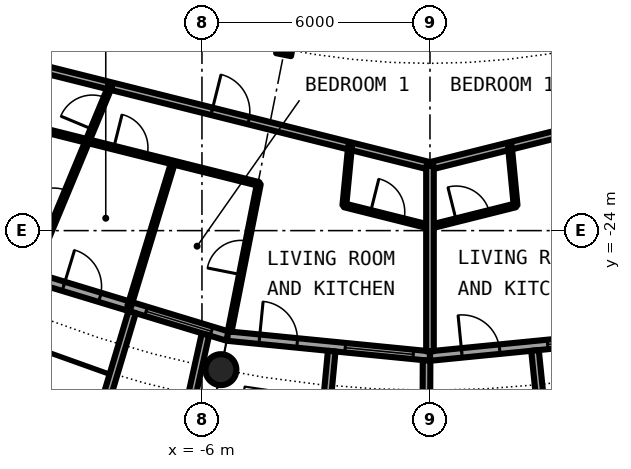
"""IFC4 building model, lengths in metres.
Left out: names, types, materials, properties, quantities, classifications, styles, units other than length and angle.
Written with IfcOpenShell. Run it as: python <this file> out.ifc"""

import sys

from ifc_helpers import new_model, si_unit, direction, frame, frame_2d, origin, origin_2d, place, context, subcontext, project, spatial, rectangle, hollow_circle, i_section, extrude, element, fill, save


model = new_model("IFC4")
c1 = context("Model", 3, precision=1e-05, world=origin(), true_north=direction((0.0, 1.0)))
c2 = subcontext(c1, "Body", "Model", "MODEL_VIEW")
j1 = project(units=[si_unit("LENGTHUNIT", "METRE"), si_unit("PLANEANGLEUNIT", "RADIAN")], contexts=[c1])
p1 = place(None, origin())
s1 = spatial("IfcSite", under=j1, at=p1, CompositionType="ELEMENT")
p2 = place(p1, origin())
s2 = spatial("IfcBuilding", under=s1, at=p2, CompositionType="ELEMENT")
p3 = place(p2, frame((0.0, 0.0, 190.2)))
s3 = spatial("IfcBuildingStorey", under=s2, at=p3, CompositionType="ELEMENT", Elevation=190.2)
p4 = place(p3, frame((-5.501, -27.658, 0.0), z_axis=(0.0, 0.0, 1.0), x_axis=(1.0, 0.0, 0.0)))
e1 = element("IfcColumn", 1, at=p4, inside=s3, PredefinedType="COLUMN", context=c2, shape_type="SweptSolid", body=[
    extrude(hollow_circle(Radius=0.406, WallThickness=0.03, at=origin_2d()), origin(), (0.0, 0.0, 1.0), 3.05),
])
p5 = place(p3, frame((-3.824, -19.223, 0.0), z_axis=(0.0, 0.0, 1.0), x_axis=(-0.195090322016, -0.980785280403, 0.0)))
e2 = element("IfcColumn", 2, at=p5, inside=s3, PredefinedType="COLUMN", context=c2, shape_type="SweptSolid", body=[
    extrude(i_section(OverallWidth=0.3, OverallDepth=0.4, WebThickness=0.013, FlangeThickness=0.024, FilletRadius=0.027, at=origin_2d()), origin(), (0.0, 0.0, 1.0), 3.05),
])
p6 = place(p3, frame((-10.447, -25.222, 0.0), z_axis=(0.0, 0.0, 1.0), x_axis=(0.956965678721, -0.290201119486, 0.0)))
e3 = element("IfcWall", 3, at=p6, inside=s3, PredefinedType="SOLIDWALL", context=c2, shape_type="SweptSolid", body=[
    extrude(rectangle(XDim=5.351, YDim=0.25, at=frame_2d((2.676, 0.0))), origin(), (0.0, 0.0, 1.0), 2.7),
])
p7 = place(p6, frame((0.841, 0.0, 0.0)))
e4 = element("IfcOpeningElement", 4, at=p7, cuts=e3, PredefinedType="OPENING", context=c2, shape_type="SweptSolid", body=[
    extrude(rectangle(XDim=1.0, YDim=2.2, at=frame_2d((0.5, 1.1))), frame((0.0, 0.135, 0.0), z_axis=(0.0, -1.0, 0.0), x_axis=(1.0, 0.0, 0.0)), (0.0, 0.0, 1.0), 0.27),
])
p8 = place(p6, frame((3.111, 0.0, 0.3)))
e5 = element("IfcOpeningElement", 5, at=p8, cuts=e3, PredefinedType="OPENING", context=c2, shape_type="SweptSolid", body=[
    extrude(rectangle(XDim=1.8, YDim=2.1, at=frame_2d((0.9, 1.05))), frame((0.0, 0.135, 0.0), z_axis=(0.0, -1.0, 0.0), x_axis=(1.0, 0.0, 0.0)), (0.0, 0.0, 1.0), 0.27),
])
p9 = place(p3, frame((-7.837, -26.144, -0.03), z_axis=(0.0, 0.0, 1.0), x_axis=(-0.287064767992, -0.957911174889, 0.0)))
e6 = element("IfcWall", 6, at=p9, inside=s3, PredefinedType="SOLIDWALL", context=c2, shape_type="SweptSolid", body=[
    extrude(rectangle(XDim=3.006, YDim=0.2, at=frame_2d((1.503, 0.0))), origin(), (0.0, 0.0, 1.0), 2.73),
])
p10 = place(p3, frame((-5.909, -26.729, -0.03), z_axis=(0.0, 0.0, 1.0), x_axis=(-0.216409053917, -0.976302781612, 0.0)))
e7 = element("IfcWall", 7, at=p10, inside=s3, PredefinedType="SOLIDWALL", context=c2, shape_type="SweptSolid", body=[
    extrude(rectangle(XDim=2.925, YDim=0.2, at=frame_2d((1.463, 0.0))), origin(), (0.0, 0.0, 1.0), 2.73),
])
p11 = place(p3, frame((-5.326, -26.775, 0.0), z_axis=(0.0, 0.0, 1.0), x_axis=(0.995173996315, -0.098126026407, 0.0)))
e8 = element("IfcWall", 8, at=p11, inside=s3, PredefinedType="SOLIDWALL", context=c2, shape_type="SweptSolid", body=[
    extrude(rectangle(XDim=5.352, YDim=0.25, at=frame_2d((2.676, 0.0))), origin(), (0.0, 0.0, 1.0), 2.7),
])
p12 = place(p11, frame((0.841, 0.0, 0.0)))
e9 = element("IfcOpeningElement", 9, at=p12, cuts=e8, PredefinedType="OPENING", context=c2, shape_type="SweptSolid", body=[
    extrude(rectangle(XDim=1.0, YDim=2.2, at=frame_2d((0.5, 1.1))), frame((0.0, 0.135, 0.0), z_axis=(0.0, -1.0, 0.0), x_axis=(1.0, 0.0, 0.0)), (0.0, 0.0, 1.0), 0.27),
])
p13 = place(p11, frame((3.111, 0.0, 0.3)))
e10 = element("IfcOpeningElement", 10, at=p13, cuts=e8, PredefinedType="OPENING", context=c2, shape_type="SweptSolid", body=[
    extrude(rectangle(XDim=1.8, YDim=2.1, at=frame_2d((0.9, 1.05))), frame((0.0, 0.135, 0.0), z_axis=(0.0, -1.0, 0.0), x_axis=(1.0, 0.0, 0.0)), (0.0, 0.0, 1.0), 0.27),
])
p14 = place(p3, frame((-2.586, -27.171, -0.03), z_axis=(0.0, 0.0, 1.0), x_axis=(-0.094548432284, -0.995520262954, 0.0)))
e11 = element("IfcWall", 11, at=p14, inside=s3, PredefinedType="SOLIDWALL", context=c2, shape_type="SweptSolid", body=[
    extrude(rectangle(XDim=3.006, YDim=0.2, at=frame_2d((1.503, 0.0))), origin(), (0.0, 0.0, 1.0), 2.73),
])
p15 = place(p3, frame((-0.09, -27.417, -0.03), z_axis=(0.0, 0.0, 1.0), x_axis=(-0.00347308367, -0.999993968827, 0.0)))
e12 = element("IfcWall", 12, at=p15, inside=s3, PredefinedType="SOLIDWALL", context=c2, shape_type="SweptSolid", body=[
    extrude(rectangle(XDim=2.882, YDim=0.2, at=frame_2d((1.441, 0.0))), origin(), (0.0, 0.0, 1.0), 2.73),
])
p16 = place(p3, frame((0.0, -27.3, 0.0), z_axis=(0.0, 0.0, 1.0), x_axis=(0.995173996315, 0.098126026407, 0.0)))
e13 = element("IfcWall", 13, at=p16, inside=s3, PredefinedType="SOLIDWALL", context=c2, shape_type="SweptSolid", body=[
    extrude(rectangle(XDim=5.352, YDim=0.25, at=frame_2d((2.676, 0.0))), origin(), (0.0, 0.0, 1.0), 2.7),
])
p17 = place(p16, frame((0.841, 0.0, 0.0)))
e14 = element("IfcOpeningElement", 14, at=p17, cuts=e13, PredefinedType="OPENING", context=c2, shape_type="SweptSolid", body=[
    extrude(rectangle(XDim=1.0, YDim=2.2, at=frame_2d((0.5, 1.1))), frame((0.0, 0.135, 0.0), z_axis=(0.0, -1.0, 0.0), x_axis=(1.0, 0.0, 0.0)), (0.0, 0.0, 1.0), 0.27),
])
p18 = place(p16, frame((3.111, 0.0, 0.3)))
e15 = element("IfcOpeningElement", 15, at=p18, cuts=e13, PredefinedType="OPENING", context=c2, shape_type="SweptSolid", body=[
    extrude(rectangle(XDim=1.8, YDim=2.1, at=frame_2d((0.9, 1.05))), frame((0.0, 0.135, 0.0), z_axis=(0.0, -1.0, 0.0), x_axis=(1.0, 0.0, 0.0)), (0.0, 0.0, 1.0), 0.27),
])
p19 = place(p3, frame((2.764, -27.153, -0.03), z_axis=(0.0, 0.0, 1.0), x_axis=(0.101505487237, -0.994834979311, 0.0)))
e16 = element("IfcWall", 16, at=p19, inside=s3, PredefinedType="SOLIDWALL", context=c2, shape_type="SweptSolid", body=[
    extrude(rectangle(XDim=3.007, YDim=0.2, at=frame_2d((1.503, 0.0))), origin(), (0.0, 0.0, 1.0), 2.73),
])
p20 = place(p3, frame((-11.266, -21.08, 0.0), z_axis=(0.0, 0.0, 1.0), x_axis=(0.970080680347, -0.24278277043, 0.0)))
e17 = element("IfcWall", 17, at=p20, inside=s3, PredefinedType="PARTITIONING", context=c2, shape_type="SweptSolid", body=[
    extrude(rectangle(XDim=6.973, YDim=0.1, at=frame_2d((3.486, 0.0))), origin(), (0.0, 0.0, 1.0), 2.7),
])
p21 = place(p20, frame((3.036, 0.0, 0.0)))
e18 = element("IfcOpeningElement", 18, at=p21, cuts=e17, PredefinedType="OPENING", context=c2, shape_type="SweptSolid", body=[
    extrude(rectangle(XDim=0.9, YDim=2.3, at=frame_2d((0.45, 1.15))), frame((0.0, 0.06, 0.0), z_axis=(0.0, -1.0, 0.0), x_axis=(1.0, 0.0, 0.0)), (0.0, 0.0, 1.0), 0.12),
])
p22 = place(p3, frame((-2.253, -23.336, 0.0), z_axis=(0.0, 0.0, 1.0), x_axis=(0.970068250789, -0.242832429489, 0.0)))
e19 = element("IfcWall", 19, at=p22, inside=s3, PredefinedType="PARTITIONING", context=c2, shape_type="SweptSolid", body=[
    extrude(rectangle(XDim=2.323, YDim=0.1, at=frame_2d((1.161, 0.0))), origin(), (0.0, 0.0, 1.0), 2.7),
])
p23 = place(p22, frame((0.711, 0.0, 0.0)))
e20 = element("IfcOpeningElement", 20, at=p23, cuts=e19, PredefinedType="OPENING", context=c2, shape_type="SweptSolid", body=[
    extrude(rectangle(XDim=0.9, YDim=2.3, at=frame_2d((0.45, 1.15))), frame((0.0, 0.06, 0.0), z_axis=(0.0, -1.0, 0.0), x_axis=(1.0, 0.0, 0.0)), (0.0, 0.0, 1.0), 0.12),
])
p24 = place(p3, frame((0.0, -23.9, 0.0), z_axis=(0.0, 0.0, 1.0), x_axis=(0.970068250789, 0.242832429489, 0.0)))
e21 = element("IfcWall", 21, at=p24, inside=s3, PredefinedType="PARTITIONING", context=c2, shape_type="SweptSolid", body=[
    extrude(rectangle(XDim=2.323, YDim=0.1, at=frame_2d((1.161, 0.0))), origin(), (0.0, 0.0, 1.0), 2.7),
])
p25 = place(p24, frame((0.711, 0.0, 0.0)))
e22 = element("IfcOpeningElement", 22, at=p25, cuts=e21, PredefinedType="OPENING", context=c2, shape_type="SweptSolid", body=[
    extrude(rectangle(XDim=0.9, YDim=2.3, at=frame_2d((0.45, 1.15))), frame((0.0, 0.06, 0.0), z_axis=(0.0, -1.0, 0.0), x_axis=(1.0, 0.0, 0.0)), (0.0, 0.0, 1.0), 0.12),
])
p26 = place(p3, frame((-10.517, -19.665, 0.0), z_axis=(0.0, 0.0, 1.0), x_axis=(0.970023226325, -0.243012222716, 0.0)))
e23 = element("IfcWall", 23, at=p26, inside=s3, PredefinedType="PARTITIONING", context=c2, shape_type="SweptSolid", body=[
    extrude(rectangle(XDim=10.847, YDim=0.2, at=frame_2d((5.424, 0.0))), origin(), (0.0, 0.0, 1.0), 2.7),
])
p27 = place(p26, frame((4.924, 0.0, 0.0)))
e24 = element("IfcOpeningElement", 24, at=p27, cuts=e23, PredefinedType="OPENING", context=c2, shape_type="SweptSolid", body=[
    extrude(rectangle(XDim=1.0, YDim=2.3, at=frame_2d((0.5, 1.15))), frame((0.0, 0.11, 0.0), z_axis=(0.0, -1.0, 0.0), x_axis=(1.0, 0.0, 0.0)), (0.0, 0.0, 1.0), 0.22),
])
p28 = place(p3, frame((-0.005, -22.301, 0.0), z_axis=(0.0, 0.0, 1.0), x_axis=(0.970023226325, 0.243012222716, 0.0)))
e25 = element("IfcWall", 25, at=p28, inside=s3, PredefinedType="PARTITIONING", context=c2, shape_type="SweptSolid", body=[
    extrude(rectangle(XDim=10.847, YDim=0.2, at=frame_2d((5.424, 0.0))), origin(), (0.0, 0.0, 1.0), 2.7),
])
p29 = place(p28, frame((4.924, 0.0, 0.0)))
e26 = element("IfcOpeningElement", 26, at=p29, cuts=e25, PredefinedType="OPENING", context=c2, shape_type="SweptSolid", body=[
    extrude(rectangle(XDim=1.0, YDim=2.3, at=frame_2d((0.5, 1.15))), frame((0.0, 0.11, 0.0), z_axis=(0.0, -1.0, 0.0), x_axis=(1.0, 0.0, 0.0)), (0.0, 0.0, 1.0), 0.22),
])
p30 = place(p3, frame((-10.447, -25.086, 0.0), z_axis=(0.0, 0.0, 1.0), x_axis=(0.384363513821, 0.923181828917, 0.0)))
e27 = element("IfcWall", 27, at=p30, inside=s3, PredefinedType="PARTITIONING", context=c2, shape_type="SweptSolid", body=[
    extrude(rectangle(XDim=5.3, YDim=0.1, at=frame_2d((2.65, 0.0))), origin(), (0.0, 0.0, 1.0), 2.7),
])
p31 = place(p30, frame((4.065, 0.0, 0.0)))
e28 = element("IfcOpeningElement", 28, at=p31, cuts=e27, PredefinedType="OPENING", context=c2, shape_type="SweptSolid", body=[
    extrude(rectangle(XDim=0.9, YDim=2.3, at=frame_2d((0.45, 1.15))), frame((0.0, 0.06, 0.0), z_axis=(0.0, -1.0, 0.0), x_axis=(1.0, 0.0, 0.0)), (0.0, 0.0, 1.0), 0.12),
])
p32 = place(p30, frame((1.415, 0.0, 0.0)))
e29 = element("IfcOpeningElement", 29, at=p32, cuts=e27, PredefinedType="OPENING", context=c2, shape_type="SweptSolid", body=[
    extrude(rectangle(XDim=0.9, YDim=2.3, at=frame_2d((0.45, 1.15))), frame((0.0, 0.06, 0.0), z_axis=(0.0, -1.0, 0.0), x_axis=(1.0, 0.0, 0.0)), (0.0, 0.0, 1.0), 0.12),
])
p33 = place(p3, frame((-7.914, -25.997, 0.0), z_axis=(0.0, 0.0, 1.0), x_axis=(0.291291575636, 0.956634317785, 0.0)))
e30 = element("IfcWall", 30, at=p33, inside=s3, PredefinedType="PARTITIONING", context=c2, shape_type="SweptSolid", body=[
    extrude(rectangle(XDim=3.962, YDim=0.1, at=frame_2d((1.981, 0.0))), origin(), (0.0, 0.0, 1.0), 2.7),
])
p34 = place(p3, frame((-5.272, -26.659, 0.0), z_axis=(0.0, 0.0, 1.0), x_axis=(0.194089507313, 0.980983824103, 0.0)))
e31 = element("IfcWall", 31, at=p34, inside=s3, PredefinedType="PARTITIONING", context=c2, shape_type="SweptSolid", body=[
    extrude(rectangle(XDim=3.962, YDim=0.1, at=frame_2d((1.981, 0.0))), origin(), (0.0, 0.0, 1.0), 2.7),
])
p35 = place(p34, frame((1.531, 0.0, 0.0)))
e32 = element("IfcOpeningElement", 32, at=p35, cuts=e31, PredefinedType="OPENING", context=c2, shape_type="SweptSolid", body=[
    extrude(rectangle(XDim=0.9, YDim=2.3, at=frame_2d((0.45, 1.15))), frame((0.0, 0.06, 0.0), z_axis=(0.0, -1.0, 0.0), x_axis=(1.0, 0.0, 0.0)), (0.0, 0.0, 1.0), 0.12),
])
p36 = place(p3, frame((-2.253, -23.336, 0.0), z_axis=(0.0, 0.0, 1.0), x_axis=(0.09608568494, 0.995373066317, 0.0)))
e33 = element("IfcWall", 33, at=p36, inside=s3, PredefinedType="PARTITIONING", context=c2, shape_type="SweptSolid", body=[
    extrude(rectangle(XDim=1.57, YDim=0.1, at=frame_2d((0.785, 0.0))), origin(), (0.0, 0.0, 1.0), 2.7),
])
p37 = place(p3, frame((0.0, -27.175, 0.0), z_axis=(0.0, 0.0, 1.0), x_axis=(0.0, 1.0, 0.0)))
e34 = element("IfcWall", 34, at=p37, inside=s3, PredefinedType="PARTITIONING", context=c2, shape_type="SweptSolid", body=[
    extrude(rectangle(XDim=4.875, YDim=0.2, at=frame_2d((2.438, 0.0))), origin(), (0.0, 0.0, 1.0), 2.7),
])
p38 = place(p3, frame((2.102, -21.773, 0.0), z_axis=(0.0, 0.0, 1.0), x_axis=(0.09608568494, -0.995373066317, 0.0)))
e35 = element("IfcWall", 35, at=p38, inside=s3, PredefinedType="PARTITIONING", context=c2, shape_type="SweptSolid", body=[
    extrude(rectangle(XDim=1.57, YDim=0.1, at=frame_2d((0.785, 0.0))), origin(), (0.0, 0.0, 1.0), 2.7),
])
p39 = place(p7, origin())
e36 = element("IfcDoor", 36, at=p39, inside=s3, OperationType="SINGLE_SWING_LEFT", PredefinedType="DOOR", context=c2, shape_type="SweptSolid", body=[
    extrude(rectangle(XDim=1.0, YDim=2.2, at=frame_2d((0.5, 1.1))), frame((0.0, 0.025, 0.0), z_axis=(0.0, -1.0, 0.0), x_axis=(1.0, 0.0, 0.0)), (0.0, 0.0, 1.0), 0.05),
])
fill(e4, e36)
p40 = place(p8, origin())
e37 = element("IfcWindow", 37, at=p40, inside=s3, PartitioningType="SINGLE_PANEL", PredefinedType="WINDOW", context=c2, shape_type="SweptSolid", body=[
    extrude(rectangle(XDim=1.8, YDim=2.1, at=frame_2d((0.9, 1.05))), frame((0.0, 0.03, 0.0), z_axis=(0.0, -1.0, 0.0), x_axis=(1.0, 0.0, 0.0)), (0.0, 0.0, 1.0), 0.06),
])
fill(e5, e37)
p41 = place(p12, origin())
e38 = element("IfcDoor", 38, at=p41, inside=s3, OperationType="SINGLE_SWING_LEFT", PredefinedType="DOOR", context=c2, shape_type="SweptSolid", body=[
    extrude(rectangle(XDim=1.0, YDim=2.2, at=frame_2d((0.5, 1.1))), frame((0.0, 0.025, 0.0), z_axis=(0.0, -1.0, 0.0), x_axis=(1.0, 0.0, 0.0)), (0.0, 0.0, 1.0), 0.05),
])
fill(e9, e38)
p42 = place(p13, origin())
e39 = element("IfcWindow", 39, at=p42, inside=s3, PartitioningType="SINGLE_PANEL", PredefinedType="WINDOW", context=c2, shape_type="SweptSolid", body=[
    extrude(rectangle(XDim=1.8, YDim=2.1, at=frame_2d((0.9, 1.05))), frame((0.0, 0.03, 0.0), z_axis=(0.0, -1.0, 0.0), x_axis=(1.0, 0.0, 0.0)), (0.0, 0.0, 1.0), 0.06),
])
fill(e10, e39)
p43 = place(p17, origin())
e40 = element("IfcDoor", 40, at=p43, inside=s3, OperationType="SINGLE_SWING_LEFT", PredefinedType="DOOR", context=c2, shape_type="SweptSolid", body=[
    extrude(rectangle(XDim=1.0, YDim=2.2, at=frame_2d((0.5, 1.1))), frame((0.0, 0.025, 0.0), z_axis=(0.0, -1.0, 0.0), x_axis=(1.0, 0.0, 0.0)), (0.0, 0.0, 1.0), 0.05),
])
fill(e14, e40)
p44 = place(p18, origin())
e41 = element("IfcWindow", 41, at=p44, inside=s3, PartitioningType="SINGLE_PANEL", PredefinedType="WINDOW", context=c2, shape_type="SweptSolid", body=[
    extrude(rectangle(XDim=1.8, YDim=2.1, at=frame_2d((0.9, 1.05))), frame((0.0, 0.03, 0.0), z_axis=(0.0, -1.0, 0.0), x_axis=(1.0, 0.0, 0.0)), (0.0, 0.0, 1.0), 0.06),
])
fill(e15, e41)
p45 = place(p27, origin())
e42 = element("IfcDoor", 42, at=p45, inside=s3, OperationType="SINGLE_SWING_RIGHT", PredefinedType="DOOR", context=c2, shape_type="SweptSolid", body=[
    extrude(rectangle(XDim=1.0, YDim=2.3, at=frame_2d((0.5, 1.15))), frame((0.0, 0.025, 0.0), z_axis=(0.0, -1.0, 0.0), x_axis=(1.0, 0.0, 0.0)), (0.0, 0.0, 1.0), 0.05),
])
fill(e24, e42)
p46 = place(p23, origin())
e43 = element("IfcDoor", 43, at=p46, inside=s3, OperationType="SINGLE_SWING_RIGHT", PredefinedType="DOOR", context=c2, shape_type="SweptSolid", body=[
    extrude(rectangle(XDim=0.9, YDim=2.3, at=frame_2d((0.45, 1.15))), frame((0.0, 0.025, 0.0), z_axis=(0.0, -1.0, 0.0), x_axis=(1.0, 0.0, 0.0)), (0.0, 0.0, 1.0), 0.05),
])
fill(e20, e43)
p47 = place(p31, origin())
e44 = element("IfcDoor", 44, at=p47, inside=s3, OperationType="SINGLE_SWING_RIGHT", PredefinedType="DOOR", context=c2, shape_type="SweptSolid", body=[
    extrude(rectangle(XDim=0.9, YDim=2.3, at=frame_2d((0.45, 1.15))), frame((0.0, 0.025, 0.0), z_axis=(0.0, -1.0, 0.0), x_axis=(1.0, 0.0, 0.0)), (0.0, 0.0, 1.0), 0.05),
])
fill(e28, e44)
p48 = place(p35, origin())
e45 = element("IfcDoor", 45, at=p48, inside=s3, OperationType="SINGLE_SWING_RIGHT", PredefinedType="DOOR", context=c2, shape_type="SweptSolid", body=[
    extrude(rectangle(XDim=0.9, YDim=2.3, at=frame_2d((0.45, 1.15))), frame((0.0, 0.025, 0.0), z_axis=(0.0, -1.0, 0.0), x_axis=(1.0, 0.0, 0.0)), (0.0, 0.0, 1.0), 0.05),
])
fill(e32, e45)
p49 = place(p21, origin())
e46 = element("IfcDoor", 46, at=p49, inside=s3, OperationType="SINGLE_SWING_LEFT", PredefinedType="DOOR", context=c2, shape_type="SweptSolid", body=[
    extrude(rectangle(XDim=0.9, YDim=2.3, at=frame_2d((0.45, 1.15))), frame((0.0, 0.025, 0.0), z_axis=(0.0, -1.0, 0.0), x_axis=(1.0, 0.0, 0.0)), (0.0, 0.0, 1.0), 0.05),
])
fill(e18, e46)
p50 = place(p32, origin())
e47 = element("IfcDoor", 47, at=p50, inside=s3, OperationType="SINGLE_SWING_LEFT", PredefinedType="DOOR", context=c2, shape_type="SweptSolid", body=[
    extrude(rectangle(XDim=0.9, YDim=2.3, at=frame_2d((0.45, 1.15))), frame((0.0, 0.025, 0.0), z_axis=(0.0, -1.0, 0.0), x_axis=(1.0, 0.0, 0.0)), (0.0, 0.0, 1.0), 0.05),
])
fill(e29, e47)
p51 = place(p25, origin())
e48 = element("IfcDoor", 48, at=p51, inside=s3, OperationType="SINGLE_SWING_LEFT", PredefinedType="DOOR", context=c2, shape_type="SweptSolid", body=[
    extrude(rectangle(XDim=0.9, YDim=2.3, at=frame_2d((0.45, 1.15))), frame((0.0, 0.025, 0.0), z_axis=(0.0, -1.0, 0.0), x_axis=(1.0, 0.0, 0.0)), (0.0, 0.0, 1.0), 0.05),
])
fill(e22, e48)
save(model, sys.argv[1])
